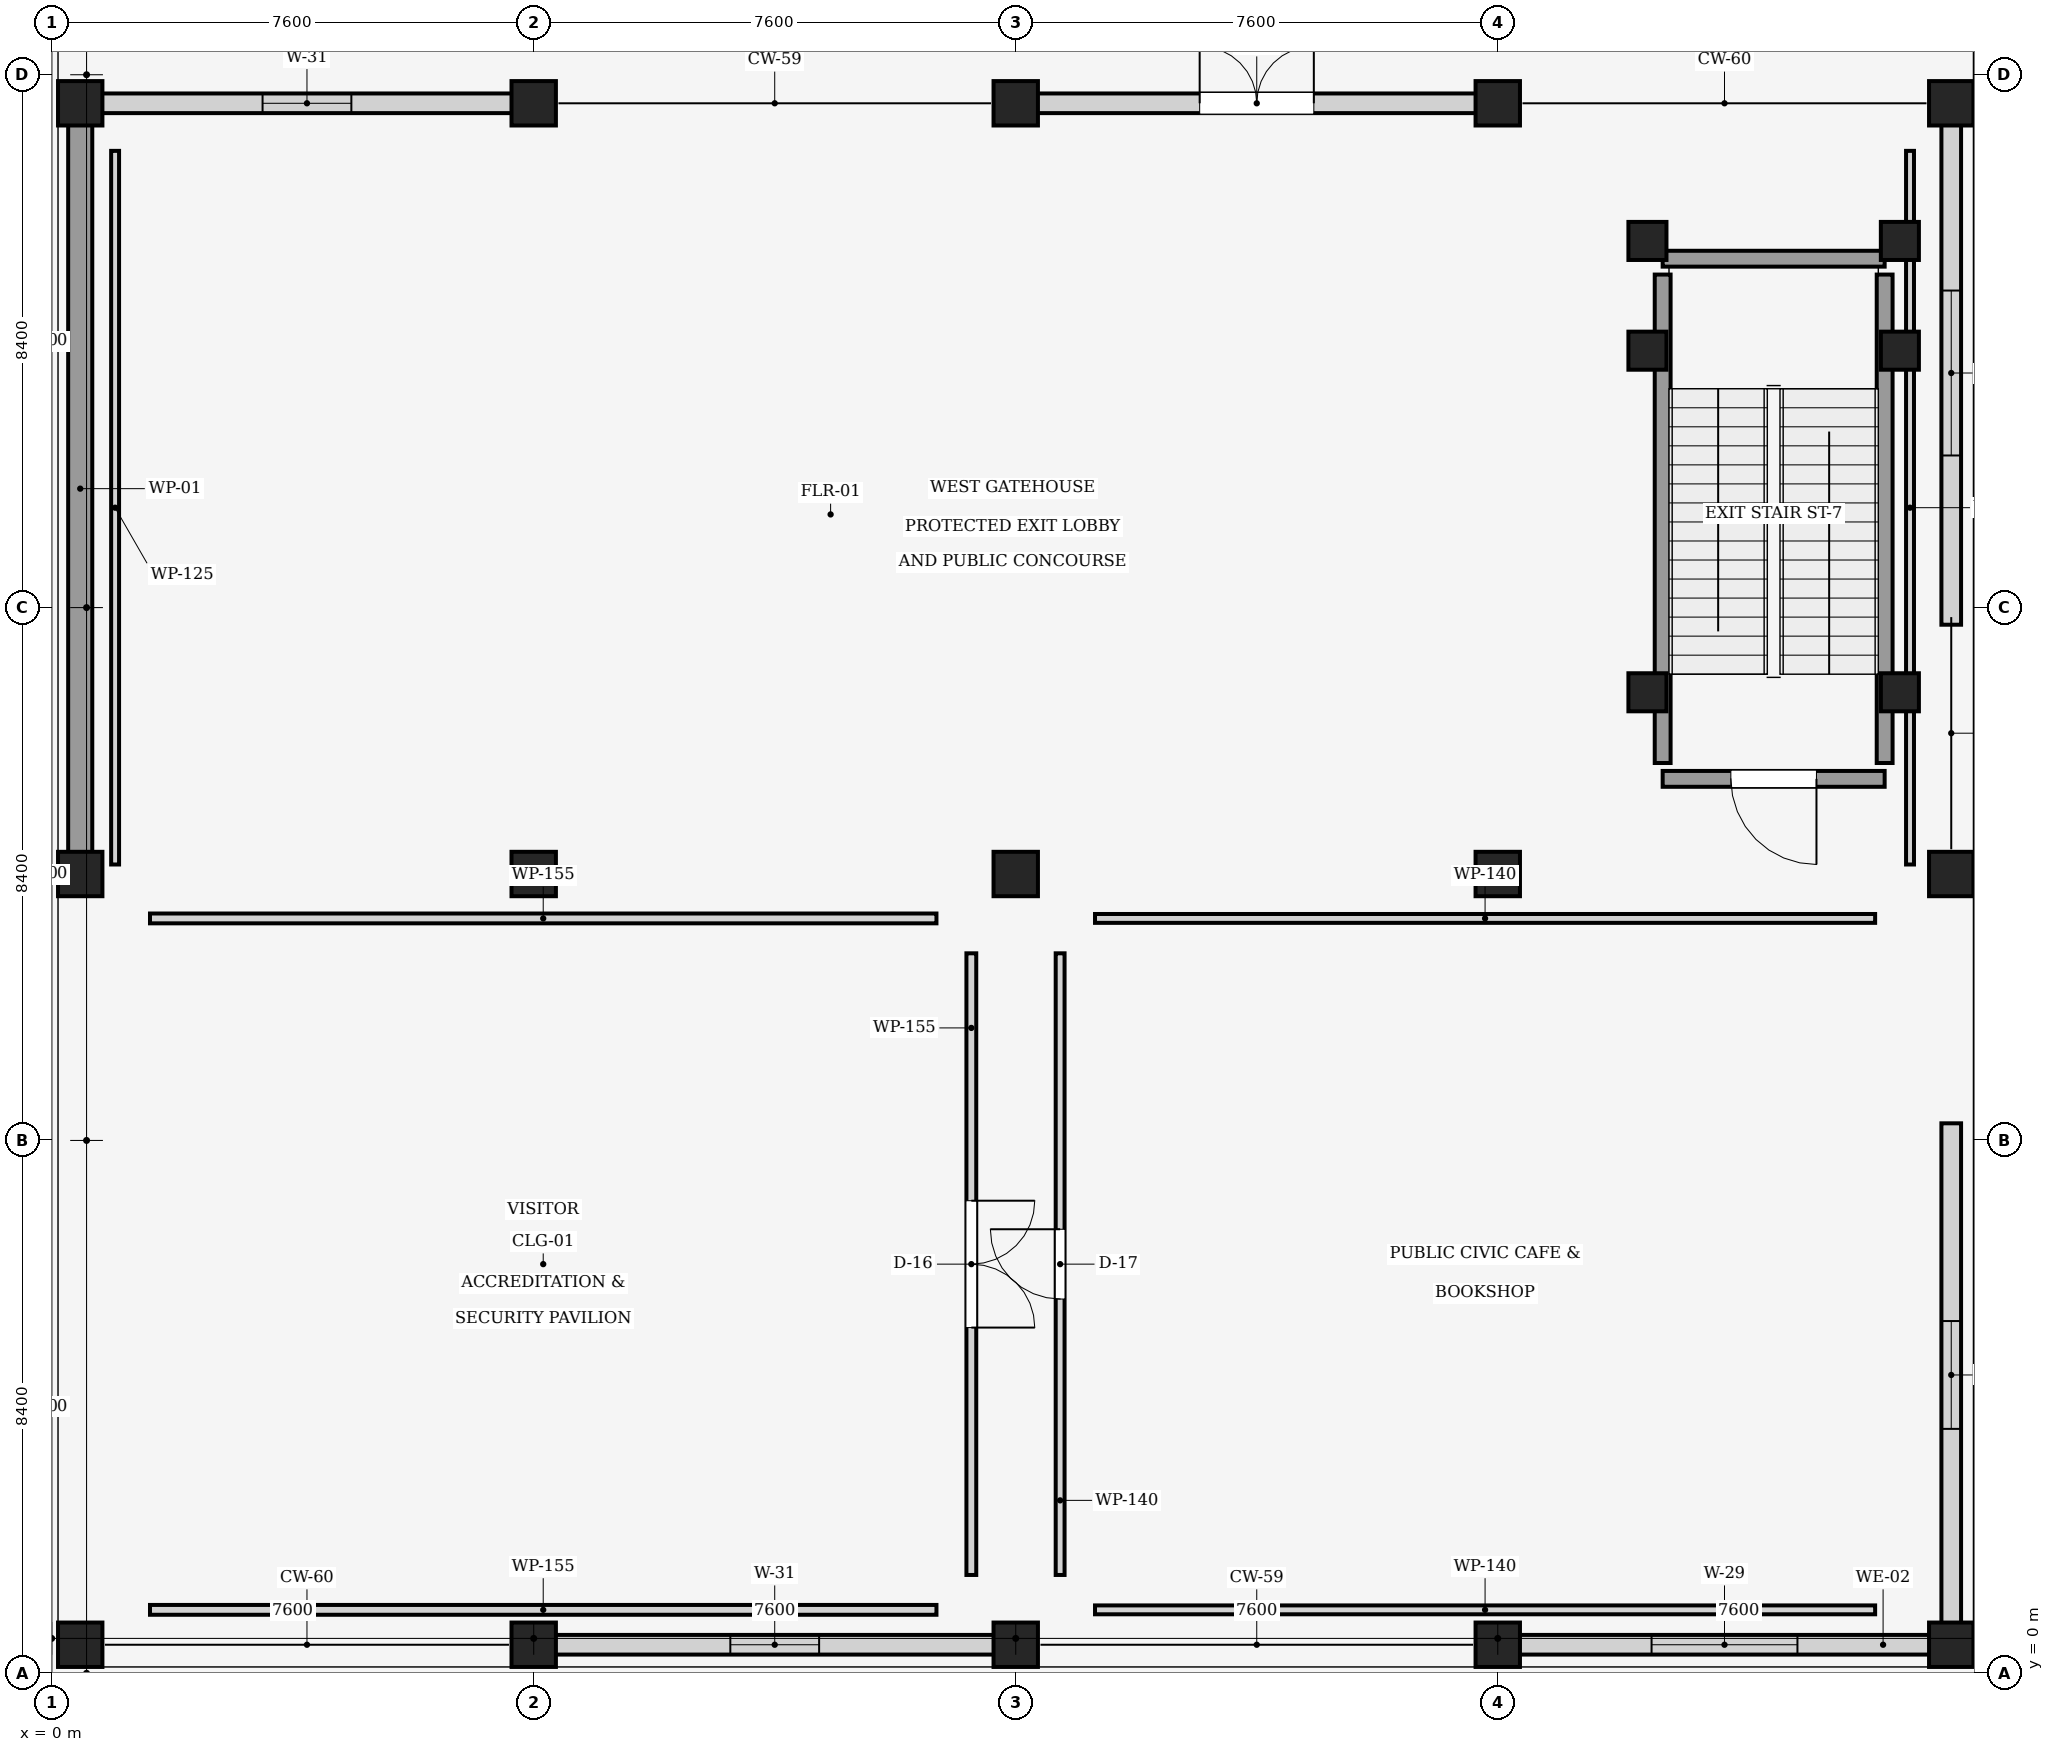
"""IFC4 building model, lengths in metres.
Left out: names, types, materials, properties, quantities, classifications, styles, units other than length and angle.
Written with IfcOpenShell. Run it as: python <this file> out.ifc"""

import sys

from ifc_helpers import new_model, si_unit, direction, frame, frame_2d, origin, origin_2d, place, context, subcontext, project, spatial, rectangle, extrude, element, fill, save


model = new_model("IFC4")
c1 = context("Model", 3, precision=1e-05, world=origin(), true_north=direction((0.0, 1.0)))
c2 = subcontext(c1, "Body", "Model", "MODEL_VIEW")
j1 = project(units=[si_unit("LENGTHUNIT", "METRE"), si_unit("PLANEANGLEUNIT", "RADIAN")], contexts=[c1])
p1 = place(None, origin())
s1 = spatial("IfcSite", under=j1, at=p1, CompositionType="ELEMENT")
p2 = place(p1, origin())
s2 = spatial("IfcBuilding", under=s1, at=p2, CompositionType="ELEMENT")
p3 = place(p2, origin())
s3 = spatial("IfcBuildingStorey", under=s2, at=p3, CompositionType="ELEMENT", Elevation=0.0)
for number, where, z_axis, x_axis in (
    (1, (0.45, 0.45, 0.0), (0.0, 0.0, 1.0), (1.0, 0.0, 0.0)),
    (2, (0.45, 12.6, 0.0), (0.0, 0.0, 1.0), (1.0, 0.0, 0.0)),
    (3, (0.45, 24.75, 0.0), (0.0, 0.0, 1.0), (1.0, 0.0, 0.0)),
    (4, (7.6, 0.45, 0.0), (0.0, 0.0, 1.0), (1.0, 0.0, 0.0)),
    (5, (7.6, 12.6, 0.0), (0.0, 0.0, 1.0), (1.0, 0.0, 0.0)),
    (6, (7.6, 24.75, 0.0), (0.0, 0.0, 1.0), (1.0, 0.0, 0.0)),
    (7, (15.2, 0.45, 0.0), (0.0, 0.0, 1.0), (1.0, 0.0, 0.0)),
    (8, (15.2, 12.6, 0.0), (0.0, 0.0, 1.0), (1.0, 0.0, 0.0)),
    (9, (15.2, 24.75, 0.0), (0.0, 0.0, 1.0), (1.0, 0.0, 0.0)),
    (10, (22.8, 0.45, 0.0), (0.0, 0.0, 1.0), (1.0, 0.0, 0.0)),
    (11, (22.8, 12.6, 0.0), (0.0, 0.0, 1.0), (1.0, 0.0, 0.0)),
    (12, (22.8, 24.75, 0.0), (0.0, 0.0, 1.0), (1.0, 0.0, 0.0)),
    (13, (29.95, 0.45, 0.0), (0.0, 0.0, 1.0), (1.0, 0.0, 0.0)),
    (14, (29.95, 12.6, 0.0), (0.0, 0.0, 1.0), (1.0, 0.0, 0.0)),
    (15, (29.95, 24.75, 0.0), (0.0, 0.0, 1.0), (1.0, 0.0, 0.0)),
):
    element("IfcColumn", number, at=place(p3, frame(where, z_axis=z_axis, x_axis=x_axis)), inside=s3, PredefinedType="COLUMN", context=c2, shape_type="SweptSolid", body=[
        extrude(rectangle(XDim=0.7, YDim=0.7, at=origin_2d()), origin(), (0.0, 0.0, 1.0), 5.1),
    ])
for number, where, z_axis, x_axis in (
    (16, (29.14, 15.465, 0.0), (0.0, 0.0, 1.0), (1.0, 0.0, 0.0)),
    (17, (25.16, 15.465, 0.0), (0.0, 0.0, 1.0), (1.0, 0.0, 0.0)),
    (18, (29.14, 20.85, 0.0), (0.0, 0.0, 1.0), (1.0, 0.0, 0.0)),
    (19, (25.16, 20.85, 0.0), (0.0, 0.0, 1.0), (1.0, 0.0, 0.0)),
    (20, (29.14, 22.58, 0.0), (0.0, 0.0, 1.0), (1.0, 0.0, 0.0)),
    (21, (25.16, 22.58, 0.0), (0.0, 0.0, 1.0), (1.0, 0.0, 0.0)),
):
    element("IfcColumn", number, at=place(p3, frame(where, z_axis=z_axis, x_axis=x_axis)), inside=s3, PredefinedType="COLUMN", context=c2, shape_type="SweptSolid", body=[
        extrude(rectangle(XDim=0.6, YDim=0.6, at=origin_2d()), origin(), (0.0, 0.0, 1.0), 5.1),
    ])
p4 = place(p3, frame((29.665, 0.45, 0.0), z_axis=(0.0, 0.0, 1.0), x_axis=(-1.0, 0.0, 0.0)))
e22 = element("IfcWall", 22, at=p4, inside=s3, PredefinedType="STANDARD", context=c2, shape_type="SweptSolid", body=[
    extrude(rectangle(XDim=6.58, YDim=0.31, at=frame_2d((3.29, 0.0))), origin(), (0.0, 0.0, 1.0), 4.045),
])
p5 = place(p4, frame((2.14, 0.0, 0.85)))
e23 = element("IfcOpeningElement", 23, at=p5, cuts=e22, PredefinedType="OPENING", context=c2, shape_type="SweptSolid", body=[
    extrude(rectangle(XDim=2.3, YDim=1.85, at=frame_2d((1.15, 0.925))), frame((0.0, 0.165, 0.0), z_axis=(0.0, -1.0, 0.0), x_axis=(1.0, 0.0, 0.0)), (0.0, 0.0, 1.0), 0.33),
])
p6 = place(p3, frame((14.915, 0.45, 0.0), z_axis=(0.0, 0.0, 1.0), x_axis=(-1.0, 0.0, 0.0)))
e24 = element("IfcWall", 24, at=p6, inside=s3, PredefinedType="STANDARD", context=c2, shape_type="SweptSolid", body=[
    extrude(rectangle(XDim=7.03, YDim=0.31, at=frame_2d((3.515, 0.0))), origin(), (0.0, 0.0, 1.0), 4.045),
])
p7 = place(p6, frame((2.815, 0.0, 0.85)))
e25 = element("IfcOpeningElement", 25, at=p7, cuts=e24, PredefinedType="OPENING", context=c2, shape_type="SweptSolid", body=[
    extrude(rectangle(XDim=1.4, YDim=2.05, at=frame_2d((0.7, 1.025))), frame((0.0, 0.165, 0.0), z_axis=(0.0, -1.0, 0.0), x_axis=(1.0, 0.0, 0.0)), (0.0, 0.0, 1.0), 0.33),
])
p8 = place(p3, frame((29.95, 24.465, 0.0), z_axis=(0.0, 0.0, 1.0), x_axis=(0.0, -1.0, 0.0)))
e26 = element("IfcWall", 26, at=p8, inside=s3, PredefinedType="STANDARD", context=c2, shape_type="SweptSolid", body=[
    extrude(rectangle(XDim=7.935, YDim=0.31, at=frame_2d((3.968, 0.0))), origin(), (0.0, 0.0, 1.0), 4.195),
])
p9 = place(p8, frame((2.667, 0.0, 0.85)))
e27 = element("IfcOpeningElement", 27, at=p9, cuts=e26, PredefinedType="OPENING", context=c2, shape_type="SweptSolid", body=[
    extrude(rectangle(XDim=2.6, YDim=1.85, at=frame_2d((1.3, 0.925))), frame((0.0, 0.165, 0.0), z_axis=(0.0, -1.0, 0.0), x_axis=(1.0, 0.0, 0.0)), (0.0, 0.0, 1.0), 0.33),
])
p10 = place(p3, frame((29.95, 8.67, 0.0), z_axis=(0.0, 0.0, 1.0), x_axis=(0.0, -1.0, 0.0)))
e28 = element("IfcWall", 28, at=p10, inside=s3, PredefinedType="STANDARD", context=c2, shape_type="SweptSolid", body=[
    extrude(rectangle(XDim=7.935, YDim=0.31, at=frame_2d((3.967, 0.0))), origin(), (0.0, 0.0, 1.0), 4.195),
])
p11 = place(p10, frame((3.117, 0.0, 0.85)))
e29 = element("IfcOpeningElement", 29, at=p11, cuts=e28, PredefinedType="OPENING", context=c2, shape_type="SweptSolid", body=[
    extrude(rectangle(XDim=1.7, YDim=2.05, at=frame_2d((0.85, 1.025))), frame((0.0, 0.165, 0.0), z_axis=(0.0, -1.0, 0.0), x_axis=(1.0, 0.0, 0.0)), (0.0, 0.0, 1.0), 0.33),
])
p12 = place(p3, frame((0.735, 24.75, 0.0), z_axis=(0.0, 0.0, 1.0), x_axis=(1.0, 0.0, 0.0)))
e30 = element("IfcWall", 30, at=p12, inside=s3, PredefinedType="STANDARD", context=c2, shape_type="SweptSolid", body=[
    extrude(rectangle(XDim=6.58, YDim=0.31, at=frame_2d((3.29, 0.0))), origin(), (0.0, 0.0, 1.0), 4.045),
])
p13 = place(p12, frame((2.59, 0.0, 0.85)))
e31 = element("IfcOpeningElement", 31, at=p13, cuts=e30, PredefinedType="OPENING", context=c2, shape_type="SweptSolid", body=[
    extrude(rectangle(XDim=1.4, YDim=2.05, at=frame_2d((0.7, 1.025))), frame((0.0, 0.165, 0.0), z_axis=(0.0, -1.0, 0.0), x_axis=(1.0, 0.0, 0.0)), (0.0, 0.0, 1.0), 0.33),
])
p14 = place(p3, frame((15.485, 24.75, 0.0), z_axis=(0.0, 0.0, 1.0), x_axis=(1.0, 0.0, 0.0)))
e32 = element("IfcWall", 32, at=p14, inside=s3, PredefinedType="STANDARD", context=c2, shape_type="SweptSolid", body=[
    extrude(rectangle(XDim=7.03, YDim=0.31, at=frame_2d((3.515, 0.0))), origin(), (0.0, 0.0, 1.0), 4.045),
])
p15 = place(p14, frame((2.615, 0.0, 0.0)))
e33 = element("IfcOpeningElement", 33, at=p15, cuts=e32, PredefinedType="OPENING", context=c2, shape_type="SweptSolid", body=[
    extrude(rectangle(XDim=1.8, YDim=2.35, at=frame_2d((0.9, 1.175))), frame((0.0, 0.165, 0.0), z_axis=(0.0, -1.0, 0.0), x_axis=(1.0, 0.0, 0.0)), (0.0, 0.0, 1.0), 0.33),
])
p16 = place(p3, frame((0.45, 12.885, 0.0), z_axis=(0.0, 0.0, 1.0), x_axis=(0.0, 1.0, 0.0)))
e34 = element("IfcWall", 34, at=p16, inside=s3, PredefinedType="SHEAR", context=c2, shape_type="SweptSolid", body=[
    extrude(rectangle(XDim=11.58, YDim=0.38, at=frame_2d((5.79, 0.0))), origin(), (0.0, 0.0, 1.0), 4.75),
])
p17 = place(p3, frame((28.9, 14.1, 0.0), z_axis=(0.0, 0.0, 1.0), x_axis=(-1.0, 0.0, 0.0)))
e35 = element("IfcWall", 35, at=p17, inside=s3, PredefinedType="SHEAR", context=c2, shape_type="SweptSolid", body=[
    extrude(rectangle(XDim=3.5, YDim=0.25, at=frame_2d((1.75, 0.0))), origin(), (0.0, 0.0, 1.0), 5.1),
])
p18 = place(p17, frame((1.075, 0.0, 0.0)))
e36 = element("IfcOpeningElement", 36, at=p18, cuts=e35, PredefinedType="OPENING", context=c2, shape_type="SweptSolid", body=[
    extrude(rectangle(XDim=1.35, YDim=2.2, at=frame_2d((0.675, 1.1))), frame((0.0, 0.135, 0.0), z_axis=(0.0, -1.0, 0.0), x_axis=(1.0, 0.0, 0.0)), (0.0, 0.0, 1.0), 0.27),
])
p19 = place(p3, frame((25.4, 14.35, 0.0), z_axis=(0.0, 0.0, 1.0), x_axis=(0.0, 1.0, 0.0)))
e37 = element("IfcWall", 37, at=p19, inside=s3, PredefinedType="SHEAR", context=c2, shape_type="SweptSolid", body=[
    extrude(rectangle(XDim=7.7, YDim=0.25, at=frame_2d((3.85, 0.0))), origin(), (0.0, 0.0, 1.0), 5.1),
])
p20 = place(p3, frame((25.4, 22.3, 0.0), z_axis=(0.0, 0.0, 1.0), x_axis=(1.0, 0.0, 0.0)))
e38 = element("IfcWall", 38, at=p20, inside=s3, PredefinedType="SHEAR", context=c2, shape_type="SweptSolid", body=[
    extrude(rectangle(XDim=3.5, YDim=0.25, at=frame_2d((1.75, 0.0))), origin(), (0.0, 0.0, 1.0), 5.1),
])
p21 = place(p3, frame((28.9, 22.05, 0.0), z_axis=(0.0, 0.0, 1.0), x_axis=(0.0, -1.0, 0.0)))
e39 = element("IfcWall", 39, at=p21, inside=s3, PredefinedType="SHEAR", context=c2, shape_type="SweptSolid", body=[
    extrude(rectangle(XDim=7.7, YDim=0.25, at=frame_2d((3.85, 0.0))), origin(), (0.0, 0.0, 1.0), 5.1),
])
p22 = place(p3, frame((14.5, 11.35, 0.0), z_axis=(0.0, 0.0, 1.0), x_axis=(0.0, -1.0, 0.0)))
e40 = element("IfcWall", 40, at=p22, inside=s3, PredefinedType="PARTITIONING", context=c2, shape_type="SweptSolid", body=[
    extrude(rectangle(XDim=9.8, YDim=0.155, at=frame_2d((4.9, 0.0))), origin(), (0.0, 0.0, 1.0), 4.73),
])
p23 = place(p22, frame((3.9, 0.0, 0.0)))
e41 = element("IfcOpeningElement", 41, at=p23, cuts=e40, PredefinedType="OPENING", context=c2, shape_type="SweptSolid", body=[
    extrude(rectangle(XDim=2.0, YDim=2.22, at=frame_2d((1.0, 1.11))), frame((0.0, 0.087, 0.0), z_axis=(0.0, -1.0, 0.0), x_axis=(1.0, 0.0, 0.0)), (0.0, 0.0, 1.0), 0.175),
])
for number, where, z_axis, x_axis in (
    (42, (1.55, 11.9, 0.0), (0.0, 0.0, 1.0), (1.0, 0.0, 0.0)),
    (43, (13.95, 1.0, 0.0), (0.0, 0.0, 1.0), (-1.0, 0.0, 0.0)),
):
    element("IfcWall", number, at=place(p3, frame(where, z_axis=z_axis, x_axis=x_axis)), inside=s3, PredefinedType="PARTITIONING", context=c2, shape_type="SweptSolid", body=[
        extrude(rectangle(XDim=12.4, YDim=0.155, at=frame_2d((6.2, 0.0))), origin(), (0.0, 0.0, 1.0), 4.195),
    ])
p24 = place(p3, frame((15.9, 1.55, 0.0), z_axis=(0.0, 0.0, 1.0), x_axis=(0.0, 1.0, 0.0)))
e44 = element("IfcWall", 44, at=p24, inside=s3, PredefinedType="PARTITIONING", context=c2, shape_type="SweptSolid", body=[
    extrude(rectangle(XDim=9.8, YDim=0.14, at=frame_2d((4.9, 0.0))), origin(), (0.0, 0.0, 1.0), 4.73),
])
p25 = place(p24, frame((4.35, 0.0, 0.0)))
e45 = element("IfcOpeningElement", 45, at=p25, cuts=e44, PredefinedType="OPENING", context=c2, shape_type="SweptSolid", body=[
    extrude(rectangle(XDim=1.1, YDim=2.35, at=frame_2d((0.55, 1.175))), frame((0.0, 0.08, 0.0), z_axis=(0.0, -1.0, 0.0), x_axis=(1.0, 0.0, 0.0)), (0.0, 0.0, 1.0), 0.16),
])
for number, where, z_axis, x_axis in (
    (46, (16.45, 11.9, 0.0), (0.0, 0.0, 1.0), (1.0, 0.0, 0.0)),
    (47, (28.75, 1.0, 0.0), (0.0, 0.0, 1.0), (-1.0, 0.0, 0.0)),
):
    element("IfcWall", number, at=place(p3, frame(where, z_axis=z_axis, x_axis=x_axis)), inside=s3, PredefinedType="PARTITIONING", context=c2, shape_type="SweptSolid", body=[
        extrude(rectangle(XDim=12.3, YDim=0.14, at=frame_2d((6.15, 0.0))), origin(), (0.0, 0.0, 1.0), 4.195),
    ])
p26 = place(p3, frame((29.3, 24.0, 0.0), z_axis=(0.0, 0.0, 1.0), x_axis=(0.0, -1.0, 0.0)))
e48 = element("IfcWall", 48, at=p26, inside=s3, PredefinedType="PARTITIONING", context=c2, shape_type="SweptSolid", body=[
    extrude(rectangle(XDim=11.25, YDim=0.125, at=frame_2d((5.625, 0.0))), origin(), (0.0, 0.0, 1.0), 2.45),
])
p27 = place(p3, frame((1.0, 12.75, 0.0), z_axis=(0.0, 0.0, 1.0), x_axis=(0.0, 1.0, 0.0)))
e49 = element("IfcWall", 49, at=p27, inside=s3, PredefinedType="PARTITIONING", context=c2, shape_type="SweptSolid", body=[
    extrude(rectangle(XDim=11.25, YDim=0.125, at=frame_2d((5.625, 0.0))), origin(), (0.0, 0.0, 1.0), 4.045),
])
p28 = place(p5, origin())
e50 = element("IfcWindow", 50, at=p28, inside=s3, PartitioningType="SINGLE_PANEL", PredefinedType="WINDOW", context=c2, shape_type="SweptSolid", body=[
    extrude(rectangle(XDim=2.3, YDim=1.85, at=frame_2d((1.15, 0.925))), frame((0.0, 0.03, 0.0), z_axis=(0.0, -1.0, 0.0), x_axis=(1.0, 0.0, 0.0)), (0.0, 0.0, 1.0), 0.06),
])
fill(e23, e50)
p29 = place(p7, origin())
e51 = element("IfcWindow", 51, at=p29, inside=s3, PartitioningType="SINGLE_PANEL", PredefinedType="WINDOW", context=c2, shape_type="SweptSolid", body=[
    extrude(rectangle(XDim=1.4, YDim=2.05, at=frame_2d((0.7, 1.025))), frame((0.0, 0.03, 0.0), z_axis=(0.0, -1.0, 0.0), x_axis=(1.0, 0.0, 0.0)), (0.0, 0.0, 1.0), 0.06),
])
fill(e25, e51)
p30 = place(p9, origin())
e52 = element("IfcWindow", 52, at=p30, inside=s3, PartitioningType="SINGLE_PANEL", PredefinedType="WINDOW", context=c2, shape_type="SweptSolid", body=[
    extrude(rectangle(XDim=2.6, YDim=1.85, at=frame_2d((1.3, 0.925))), frame((0.0, 0.03, 0.0), z_axis=(0.0, -1.0, 0.0), x_axis=(1.0, 0.0, 0.0)), (0.0, 0.0, 1.0), 0.06),
])
fill(e27, e52)
p31 = place(p11, origin())
e53 = element("IfcWindow", 53, at=p31, inside=s3, PartitioningType="SINGLE_PANEL", PredefinedType="WINDOW", context=c2, shape_type="SweptSolid", body=[
    extrude(rectangle(XDim=1.7, YDim=2.05, at=frame_2d((0.85, 1.025))), frame((0.0, 0.03, 0.0), z_axis=(0.0, -1.0, 0.0), x_axis=(1.0, 0.0, 0.0)), (0.0, 0.0, 1.0), 0.06),
])
fill(e29, e53)
p32 = place(p13, origin())
e54 = element("IfcWindow", 54, at=p32, inside=s3, PartitioningType="SINGLE_PANEL", PredefinedType="WINDOW", context=c2, shape_type="SweptSolid", body=[
    extrude(rectangle(XDim=1.4, YDim=2.05, at=frame_2d((0.7, 1.025))), frame((0.0, 0.03, 0.0), z_axis=(0.0, -1.0, 0.0), x_axis=(1.0, 0.0, 0.0)), (0.0, 0.0, 1.0), 0.06),
])
fill(e31, e54)
p33 = place(p15, origin())
e55 = element("IfcDoor", 55, at=p33, inside=s3, OperationType="DOUBLE_DOOR_SINGLE_SWING", PredefinedType="DOOR", context=c2, shape_type="SweptSolid", body=[
    extrude(rectangle(XDim=1.8, YDim=2.35, at=frame_2d((0.9, 1.175))), frame((0.0, 0.025, 0.0), z_axis=(0.0, -1.0, 0.0), x_axis=(1.0, 0.0, 0.0)), (0.0, 0.0, 1.0), 0.05),
])
fill(e33, e55)
p34 = place(p18, origin())
e56 = element("IfcDoor", 56, at=p34, inside=s3, OperationType="SINGLE_SWING_LEFT", PredefinedType="DOOR", context=c2, shape_type="SweptSolid", body=[
    extrude(rectangle(XDim=1.35, YDim=2.2, at=frame_2d((0.675, 1.1))), frame((0.0, 0.025, 0.0), z_axis=(0.0, -1.0, 0.0), x_axis=(1.0, 0.0, 0.0)), (0.0, 0.0, 1.0), 0.05),
])
fill(e36, e56)
p35 = place(p23, origin())
e57 = element("IfcDoor", 57, at=p35, inside=s3, OperationType="DOUBLE_DOOR_SINGLE_SWING", PredefinedType="DOOR", context=c2, shape_type="SweptSolid", body=[
    extrude(rectangle(XDim=2.0, YDim=2.22, at=frame_2d((1.0, 1.11))), frame((0.0, 0.025, 0.0), z_axis=(0.0, -1.0, 0.0), x_axis=(1.0, 0.0, 0.0)), (0.0, 0.0, 1.0), 0.05),
])
fill(e41, e57)
p36 = place(p25, origin())
e58 = element("IfcDoor", 58, at=p36, inside=s3, OperationType="SINGLE_SWING_RIGHT", PredefinedType="DOOR", context=c2, shape_type="SweptSolid", body=[
    extrude(rectangle(XDim=1.1, YDim=2.35, at=frame_2d((0.55, 1.175))), frame((0.0, 0.025, 0.0), z_axis=(0.0, -1.0, 0.0), x_axis=(1.0, 0.0, 0.0)), (0.0, 0.0, 1.0), 0.05),
])
fill(e45, e58)
save(model, sys.argv[1])
